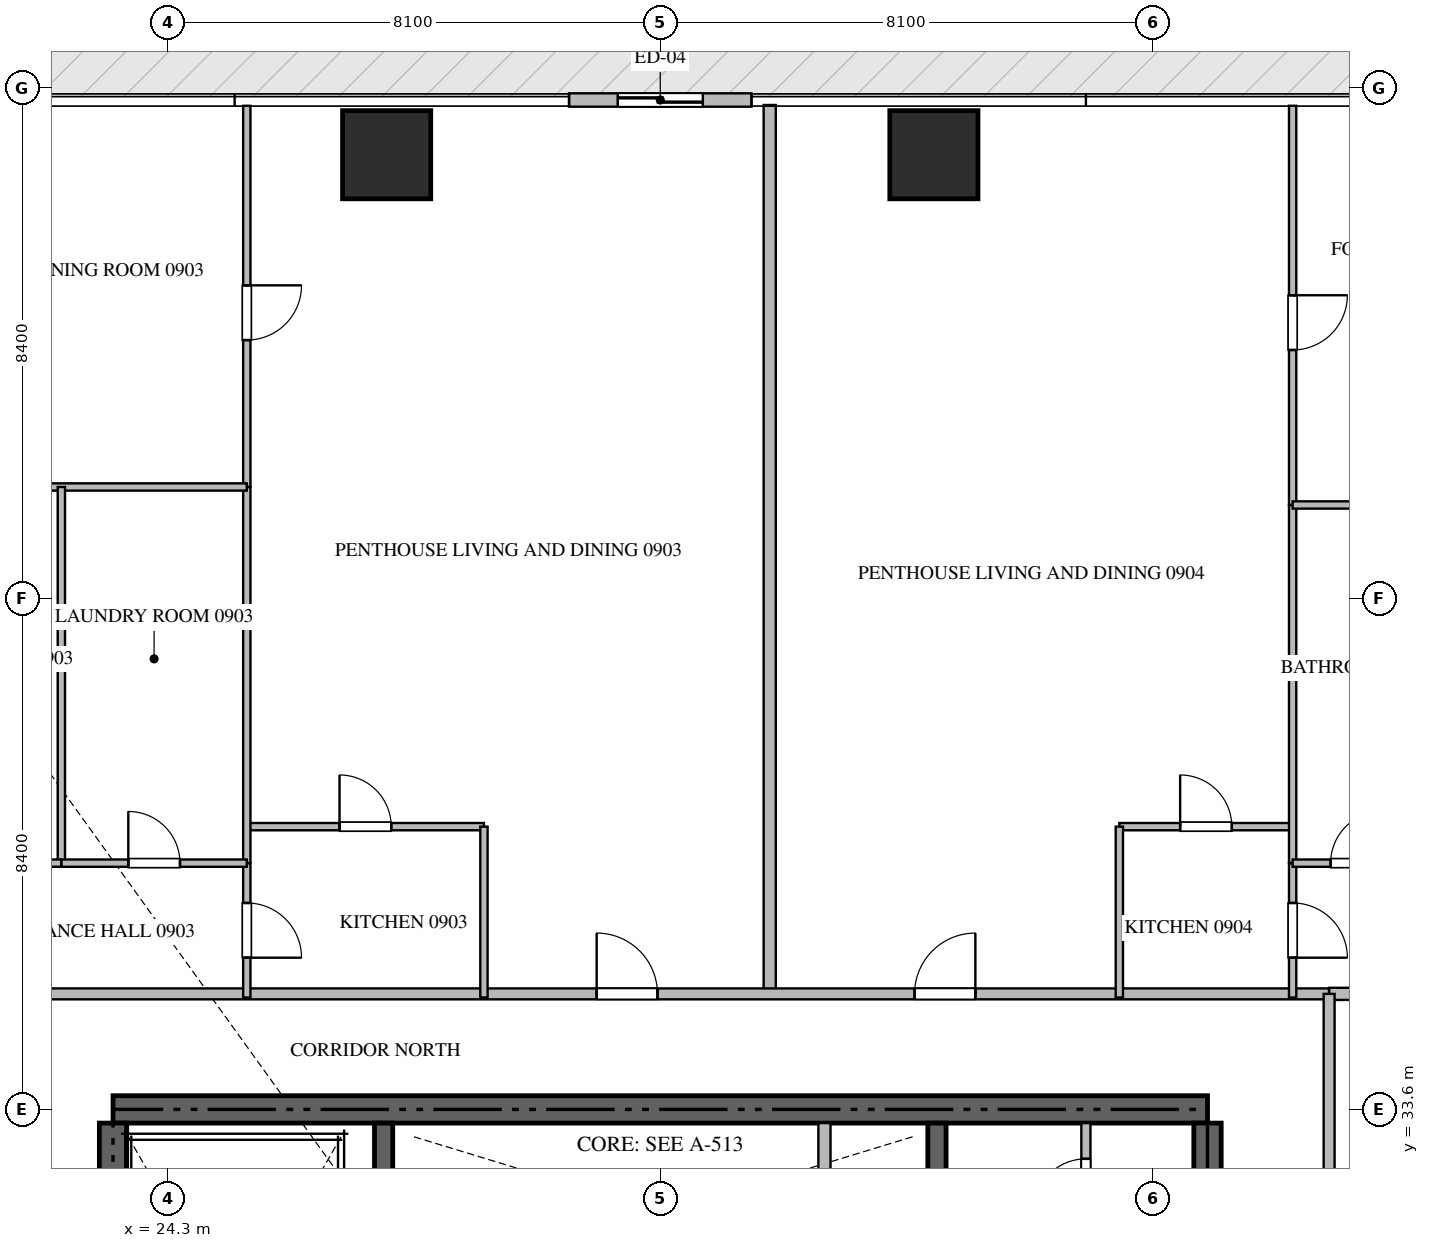
"""IFC4 building model, lengths in metres.
Left out: names, types, materials, properties, quantities, classifications, styles, units other than length and angle.
Written with IfcOpenShell. Run it as: python <this file> out.ifc"""

import sys

from ifc_helpers import new_model, si_unit, direction, frame, frame_2d, origin, origin_2d, place, context, subcontext, project, spatial, rectangle, extrude, source, transform, mapped, element, fill, save


model = new_model("IFC4")
c1 = context("Model", 3, precision=1e-05, world=origin(), true_north=direction((0.0, 1.0)))
c2 = subcontext(c1, "Body", "Model", "MODEL_VIEW")
j1 = project(units=[si_unit("LENGTHUNIT", "METRE"), si_unit("PLANEANGLEUNIT", "RADIAN")], contexts=[c1])
p1 = place(None, origin())
s1 = spatial("IfcSite", under=j1, at=p1, CompositionType="ELEMENT")
p2 = place(p1, origin())
s2 = spatial("IfcBuilding", under=s1, at=p2, CompositionType="ELEMENT")
p3 = place(p2, frame((0.0, 0.0, 41.7)))
s3 = spatial("IfcBuildingStorey", under=s2, at=p3, CompositionType="ELEMENT", Elevation=41.7)
p4 = place(p3, frame((41.4, 33.6, -0.26), z_axis=(0.0, 0.0, 1.0), x_axis=(-1.0, 0.0, 0.0)))
e1 = element("IfcWall", 1, at=p4, inside=s3, PredefinedType="SHEAR", context=c2, shape_type="SweptSolid", body=[
    extrude(rectangle(XDim=18.0, YDim=0.45, at=frame_2d((9.0, 0.0))), origin(), (0.0, 0.0, 1.0), 3.748),
])
p5 = place(p3, frame((23.4, 24.25, -0.26), z_axis=(0.0, 0.0, 1.0), x_axis=(0.0, 1.0, 0.0)))
e2 = element("IfcWall", 2, at=p5, inside=s3, PredefinedType="SHEAR", context=c2, shape_type="SweptSolid", body=[
    extrude(rectangle(XDim=9.125, YDim=0.45, at=frame_2d((4.562, 0.0))), origin(), (0.0, 0.0, 1.0), 3.748),
])
p6 = place(p3, frame((41.4, 27.75, -0.26), z_axis=(0.0, 0.0, 1.0), x_axis=(0.0, 1.0, 0.0)))
e3 = element("IfcWall", 3, at=p6, inside=s3, PredefinedType="SHEAR", context=c2, shape_type="SweptSolid", body=[
    extrude(rectangle(XDim=5.625, YDim=0.45, at=frame_2d((2.812, 0.0))), origin(), (0.0, 0.0, 1.0), 3.748),
])
p7 = place(p3, frame((27.85, 23.55, -0.26), z_axis=(0.0, 0.0, 1.0), x_axis=(0.0, 1.0, 0.0)))
e4 = element("IfcWall", 4, at=p7, inside=s3, PredefinedType="SHEAR", context=c2, shape_type="SweptSolid", body=[
    extrude(rectangle(XDim=9.825, YDim=0.3, at=frame_2d((4.913, 0.0))), origin(), (0.0, 0.0, 1.0), 3.748),
])
p8 = place(p3, frame((36.95, 27.05, -0.26), z_axis=(0.0, 0.0, 1.0), x_axis=(0.0, 1.0, 0.0)))
e5 = element("IfcWall", 5, at=p8, inside=s3, PredefinedType="SHEAR", context=c2, shape_type="SweptSolid", body=[
    extrude(rectangle(XDim=6.325, YDim=0.3, at=frame_2d((3.163, 0.0))), origin(), (0.0, 0.0, 1.0), 3.748),
])
m1 = source(origin(), c2, "Body", "SweptSolid", [
    extrude(rectangle(XDim=1.45, YDim=1.45, at=origin_2d()), origin(), (0.0, 0.0, 1.0), 3.75),
])
for number, where, z_axis, x_axis in (
    (6, (27.9, 49.3, -0.26), (0.0, 0.0, 1.0), (1.0, 0.0, 0.0)),
    (7, (36.9, 49.3, -0.26), (0.0, 0.0, 1.0), (1.0, 0.0, 0.0)),
):
    element("IfcColumn", number, at=place(p3, frame(where, z_axis=z_axis, x_axis=x_axis)), inside=s3, PredefinedType="COLUMN", context=c2, shape_type="MappedRepresentation", body=[
        mapped(m1, transform((0.0, 0.0, 0.0), scale=1.0)),
    ])
p9 = place(p3, frame((33.9, 50.2, 0.0), z_axis=(0.0, 0.0, 1.0), x_axis=(-1.0, 0.0, 0.0)))
e8 = element("IfcWall", 8, at=p9, inside=s3, PredefinedType="ELEMENTEDWALL", context=c2, shape_type="SweptSolid", body=[
    extrude(rectangle(XDim=3.0, YDim=0.22, at=frame_2d((1.5, 0.0))), origin(), (0.0, 0.0, 1.0), 3.475),
])
p10 = place(p9, frame((0.8, 0.0, 0.0)))
e9 = element("IfcOpeningElement", 9, at=p10, cuts=e8, PredefinedType="OPENING", context=c2, shape_type="SweptSolid", body=[
    extrude(rectangle(XDim=1.4, YDim=2.25, at=frame_2d((0.7, 1.125))), frame((0.0, 0.12, 0.0), z_axis=(0.0, -1.0, 0.0), x_axis=(1.0, 0.0, 0.0)), (0.0, 0.0, 1.0), 0.24),
])
p11 = place(p3, frame((35.1, 30.75, 0.0), z_axis=(0.0, 0.0, 1.0), x_axis=(0.0, 1.0, 0.0)))
e10 = element("IfcWall", 10, at=p11, inside=s3, PredefinedType="STANDARD", context=c2, shape_type="SweptSolid", body=[
    extrude(rectangle(XDim=2.625, YDim=0.2, at=frame_2d((1.312, 0.0))), origin(), (0.0, 0.0, 1.0), 3.49),
])
p12 = place(p3, frame((39.4, 31.35, 0.0), z_axis=(0.0, 0.0, 1.0), x_axis=(0.0, 1.0, 0.0)))
e11 = element("IfcWall", 11, at=p12, inside=s3, PredefinedType="PARTITIONING", context=c2, shape_type="SweptSolid", body=[
    extrude(rectangle(XDim=2.025, YDim=0.15, at=frame_2d((1.012, 0.0))), origin(), (0.0, 0.0, 1.0), 3.49),
])
p13 = place(p12, frame((0.587, 0.0, 0.0)))
e12 = element("IfcOpeningElement", 12, at=p13, cuts=e11, PredefinedType="OPENING", context=c2, shape_type="SweptSolid", body=[
    extrude(rectangle(XDim=0.85, YDim=2.1, at=frame_2d((0.425, 1.05))), frame((0.0, 0.085, 0.0), z_axis=(0.0, -1.0, 0.0), x_axis=(1.0, 0.0, 0.0)), (0.0, 0.0, 1.0), 0.17),
])
p14 = place(p3, frame((34.2, 35.5, 0.0), z_axis=(0.0, 0.0, 1.0), x_axis=(0.0, 1.0, 0.0)))
e13 = element("IfcWall", 13, at=p14, inside=s3, PredefinedType="PARTITIONING", context=c2, shape_type="SweptSolid", body=[
    extrude(rectangle(XDim=14.618, YDim=0.2, at=frame_2d((7.309, 0.0))), origin(), (0.0, 0.0, 1.0), 3.49),
])
p15 = place(p3, frame((43.4, 35.5, 0.0), z_axis=(0.0, 0.0, 1.0), x_axis=(1.0, 0.0, 0.0)))
e14 = element("IfcWall", 14, at=p15, inside=s3, PredefinedType="PARTITIONING", context=c2, shape_type="SweptSolid", body=[
    extrude(rectangle(XDim=15.318, YDim=0.2, at=frame_2d((7.659, 0.0))), origin(), (0.0, 0.0, 1.0), 3.49),
])
p16 = place(p3, frame((21.402, 35.5, 0.0), z_axis=(0.0, 0.0, 1.0), x_axis=(1.0, 0.0, 0.0)))
e15 = element("IfcWall", 15, at=p16, inside=s3, PredefinedType="PARTITIONING", context=c2, shape_type="SweptSolid", body=[
    extrude(rectangle(XDim=21.996, YDim=0.18, at=frame_2d((10.998, 0.0))), origin(), (0.0, 0.0, 1.0), 3.49),
])
p17 = place(p16, frame((9.952, 0.0, 0.0)))
e16 = element("IfcOpeningElement", 16, at=p17, cuts=e15, PredefinedType="OPENING", context=c2, shape_type="SweptSolid", body=[
    extrude(rectangle(XDim=1.0, YDim=2.15, at=frame_2d((0.5, 1.075))), frame((0.0, 0.1, 0.0), z_axis=(0.0, -1.0, 0.0), x_axis=(1.0, 0.0, 0.0)), (0.0, 0.0, 1.0), 0.2),
])
p18 = place(p16, frame((15.18, 0.0, 0.0)))
e17 = element("IfcOpeningElement", 17, at=p18, cuts=e15, PredefinedType="OPENING", context=c2, shape_type="SweptSolid", body=[
    extrude(rectangle(XDim=1.0, YDim=2.15, at=frame_2d((0.5, 1.075))), frame((0.0, 0.1, 0.0), z_axis=(0.0, -1.0, 0.0), x_axis=(1.0, 0.0, 0.0)), (0.0, 0.0, 1.0), 0.2),
])
p19 = place(p3, frame((43.4, 14.9, 0.0), z_axis=(0.0, 0.0, 1.0), x_axis=(0.0, 1.0, 0.0)))
e18 = element("IfcWall", 18, at=p19, inside=s3, PredefinedType="PARTITIONING", context=c2, shape_type="SweptSolid", body=[
    extrude(rectangle(XDim=20.6, YDim=0.18, at=frame_2d((10.3, 0.0))), origin(), (0.0, 0.0, 1.0), 3.49),
])
p20 = place(p19, frame((1.96, 0.0, 0.0)))
e19 = element("IfcOpeningElement", 19, at=p20, cuts=e18, PredefinedType="OPENING", context=c2, shape_type="SweptSolid", body=[
    extrude(rectangle(XDim=1.0, YDim=2.15, at=frame_2d((0.5, 1.075))), frame((0.0, 0.1, 0.0), z_axis=(0.0, -1.0, 0.0), x_axis=(1.0, 0.0, 0.0)), (0.0, 0.0, 1.0), 0.2),
])
p21 = place(p3, frame((25.6, 38.25, 0.0), z_axis=(0.0, 0.0, 1.0), x_axis=(1.0, 0.0, 0.0)))
e20 = element("IfcWall", 20, at=p21, inside=s3, PredefinedType="PARTITIONING", context=c2, shape_type="SweptSolid", body=[
    extrude(rectangle(XDim=3.9, YDim=0.12, at=frame_2d((1.95, 0.0))), origin(), (0.0, 0.0, 1.0), 3.49),
])
p22 = place(p21, frame((1.525, 0.0, 0.0)))
e21 = element("IfcOpeningElement", 21, at=p22, cuts=e20, PredefinedType="OPENING", context=c2, shape_type="SweptSolid", body=[
    extrude(rectangle(XDim=0.85, YDim=2.1, at=frame_2d((0.425, 1.05))), frame((0.0, 0.07, 0.0), z_axis=(0.0, -1.0, 0.0), x_axis=(1.0, 0.0, 0.0)), (0.0, 0.0, 1.0), 0.14),
])
p23 = place(p3, frame((29.5, 38.25, 0.0), z_axis=(0.0, 0.0, 1.0), x_axis=(0.0, -1.0, 0.0)))
e22 = element("IfcWall", 22, at=p23, inside=s3, PredefinedType="PARTITIONING", context=c2, shape_type="SweptSolid", body=[
    extrude(rectangle(XDim=2.81, YDim=0.12, at=frame_2d((1.405, 0.0))), origin(), (0.0, 0.0, 1.0), 3.49),
])
p24 = place(p3, frame((25.6, 37.65, 0.0), z_axis=(0.0, 0.0, 1.0), x_axis=(0.0, -1.0, 0.0)))
e23 = element("IfcWall", 23, at=p24, inside=s3, PredefinedType="PARTITIONING", context=c2, shape_type="SweptSolid", body=[
    extrude(rectangle(XDim=2.21, YDim=0.12, at=frame_2d((1.105, 0.0))), origin(), (0.0, 0.0, 1.0), 3.49),
])
p25 = place(p24, frame((0.655, 0.0, 0.0)))
e24 = element("IfcOpeningElement", 24, at=p25, cuts=e23, PredefinedType="OPENING", context=c2, shape_type="SweptSolid", body=[
    extrude(rectangle(XDim=0.9, YDim=2.1, at=frame_2d((0.45, 1.05))), frame((0.0, 0.07, 0.0), z_axis=(0.0, -1.0, 0.0), x_axis=(1.0, 0.0, 0.0)), (0.0, 0.0, 1.0), 0.14),
])
p26 = place(p3, frame((25.6, 50.105, 0.0), z_axis=(0.0, 0.0, 1.0), x_axis=(0.0, -1.0, 0.0)))
e25 = element("IfcWall", 25, at=p26, inside=s3, PredefinedType="PARTITIONING", context=c2, shape_type="SweptSolid", body=[
    extrude(rectangle(XDim=6.269, YDim=0.12, at=frame_2d((3.135, 0.0))), origin(), (0.0, 0.0, 1.0), 3.49),
])
p27 = place(p26, frame((2.953, 0.0, 0.0)))
e26 = element("IfcOpeningElement", 26, at=p27, cuts=e25, PredefinedType="OPENING", context=c2, shape_type="SweptSolid", body=[
    extrude(rectangle(XDim=0.9, YDim=2.1, at=frame_2d((0.45, 1.05))), frame((0.0, 0.07, 0.0), z_axis=(0.0, -1.0, 0.0), x_axis=(1.0, 0.0, 0.0)), (0.0, 0.0, 1.0), 0.14),
])
p28 = place(p3, frame((25.6, 43.834, 0.0), z_axis=(0.0, 0.0, 1.0), x_axis=(0.0, -1.0, 0.0)))
e27 = element("IfcWall", 27, at=p28, inside=s3, PredefinedType="PARTITIONING", context=c2, shape_type="SweptSolid", body=[
    extrude(rectangle(XDim=6.182, YDim=0.12, at=frame_2d((3.091, 0.0))), origin(), (0.0, 0.0, 1.0), 3.49),
])
p29 = place(p3, frame((20.45, 43.836, 0.0), z_axis=(0.0, 0.0, 1.0), x_axis=(1.0, 0.0, 0.0)))
e28 = element("IfcWall", 28, at=p29, inside=s3, PredefinedType="PARTITIONING", context=c2, shape_type="SweptSolid", body=[
    extrude(rectangle(XDim=5.15, YDim=0.12, at=frame_2d((2.575, 0.0))), origin(), (0.0, 0.0, 1.0), 3.49),
])
p30 = place(p3, frame((22.55, 43.836, 0.0), z_axis=(0.0, 0.0, 1.0), x_axis=(0.0, -1.0, 0.0)))
e29 = element("IfcWall", 29, at=p30, inside=s3, PredefinedType="PARTITIONING", context=c2, shape_type="SweptSolid", body=[
    extrude(rectangle(XDim=6.186, YDim=0.12, at=frame_2d((3.093, 0.0))), origin(), (0.0, 0.0, 1.0), 3.49),
])
p31 = place(p3, frame((20.45, 37.65, 0.0), z_axis=(0.0, 0.0, 1.0), x_axis=(1.0, 0.0, 0.0)))
e30 = element("IfcWall", 30, at=p31, inside=s3, PredefinedType="PARTITIONING", context=c2, shape_type="SweptSolid", body=[
    extrude(rectangle(XDim=2.1, YDim=0.12, at=frame_2d((1.05, 0.0))), origin(), (0.0, 0.0, 1.0), 3.49),
])
p32 = place(p31, frame((0.625, 0.0, 0.0)))
e31 = element("IfcOpeningElement", 31, at=p32, cuts=e30, PredefinedType="OPENING", context=c2, shape_type="SweptSolid", body=[
    extrude(rectangle(XDim=0.85, YDim=2.1, at=frame_2d((0.425, 1.05))), frame((0.0, 0.07, 0.0), z_axis=(0.0, -1.0, 0.0), x_axis=(1.0, 0.0, 0.0)), (0.0, 0.0, 1.0), 0.14),
])
p33 = place(p3, frame((22.552, 37.65, 0.0), z_axis=(0.0, 0.0, 1.0), x_axis=(1.0, 0.0, 0.0)))
e32 = element("IfcWall", 32, at=p33, inside=s3, PredefinedType="PARTITIONING", context=c2, shape_type="SweptSolid", body=[
    extrude(rectangle(XDim=3.048, YDim=0.12, at=frame_2d((1.524, 0.0))), origin(), (0.0, 0.0, 1.0), 3.49),
])
p34 = place(p33, frame((1.099, 0.0, 0.0)))
e33 = element("IfcOpeningElement", 33, at=p34, cuts=e32, PredefinedType="OPENING", context=c2, shape_type="SweptSolid", body=[
    extrude(rectangle(XDim=0.85, YDim=2.1, at=frame_2d((0.425, 1.05))), frame((0.0, 0.07, 0.0), z_axis=(0.0, -1.0, 0.0), x_axis=(1.0, 0.0, 0.0)), (0.0, 0.0, 1.0), 0.14),
])
p35 = place(p3, frame((39.95, 38.25, 0.0), z_axis=(0.0, 0.0, 1.0), x_axis=(1.0, 0.0, 0.0)))
e34 = element("IfcWall", 34, at=p35, inside=s3, PredefinedType="PARTITIONING", context=c2, shape_type="SweptSolid", body=[
    extrude(rectangle(XDim=2.85, YDim=0.12, at=frame_2d((1.425, 0.0))), origin(), (0.0, 0.0, 1.0), 3.49),
])
p36 = place(p35, frame((1.0, 0.0, 0.0)))
e35 = element("IfcOpeningElement", 35, at=p36, cuts=e34, PredefinedType="OPENING", context=c2, shape_type="SweptSolid", body=[
    extrude(rectangle(XDim=0.85, YDim=2.1, at=frame_2d((0.425, 1.05))), frame((0.0, 0.07, 0.0), z_axis=(0.0, -1.0, 0.0), x_axis=(1.0, 0.0, 0.0)), (0.0, 0.0, 1.0), 0.14),
])
p37 = place(p3, frame((39.95, 38.25, 0.0), z_axis=(0.0, 0.0, 1.0), x_axis=(0.0, -1.0, 0.0)))
e36 = element("IfcWall", 36, at=p37, inside=s3, PredefinedType="PARTITIONING", context=c2, shape_type="SweptSolid", body=[
    extrude(rectangle(XDim=2.81, YDim=0.12, at=frame_2d((1.405, 0.0))), origin(), (0.0, 0.0, 1.0), 3.49),
])
p38 = place(p3, frame((42.8, 37.65, 0.0), z_axis=(0.0, 0.0, 1.0), x_axis=(0.0, -1.0, 0.0)))
e37 = element("IfcWall", 37, at=p38, inside=s3, PredefinedType="PARTITIONING", context=c2, shape_type="SweptSolid", body=[
    extrude(rectangle(XDim=2.21, YDim=0.12, at=frame_2d((1.105, 0.0))), origin(), (0.0, 0.0, 1.0), 3.49),
])
p39 = place(p38, frame((0.655, 0.0, 0.0)))
e38 = element("IfcOpeningElement", 38, at=p39, cuts=e37, PredefinedType="OPENING", context=c2, shape_type="SweptSolid", body=[
    extrude(rectangle(XDim=0.9, YDim=2.1, at=frame_2d((0.45, 1.05))), frame((0.0, 0.07, 0.0), z_axis=(0.0, -1.0, 0.0), x_axis=(1.0, 0.0, 0.0)), (0.0, 0.0, 1.0), 0.14),
])
p40 = place(p3, frame((42.8, 50.105, 0.0), z_axis=(0.0, 0.0, 1.0), x_axis=(0.0, -1.0, 0.0)))
e39 = element("IfcWall", 39, at=p40, inside=s3, PredefinedType="PARTITIONING", context=c2, shape_type="SweptSolid", body=[
    extrude(rectangle(XDim=6.565, YDim=0.12, at=frame_2d((3.282, 0.0))), origin(), (0.0, 0.0, 1.0), 3.49),
])
p41 = place(p40, frame((3.116, 0.0, 0.0)))
e40 = element("IfcOpeningElement", 40, at=p41, cuts=e39, PredefinedType="OPENING", context=c2, shape_type="SweptSolid", body=[
    extrude(rectangle(XDim=0.9, YDim=2.1, at=frame_2d((0.45, 1.05))), frame((0.0, 0.07, 0.0), z_axis=(0.0, -1.0, 0.0), x_axis=(1.0, 0.0, 0.0)), (0.0, 0.0, 1.0), 0.14),
])
p42 = place(p3, frame((42.8, 43.538, 0.0), z_axis=(0.0, 0.0, 1.0), x_axis=(0.0, -1.0, 0.0)))
e41 = element("IfcWall", 41, at=p42, inside=s3, PredefinedType="PARTITIONING", context=c2, shape_type="SweptSolid", body=[
    extrude(rectangle(XDim=5.886, YDim=0.12, at=frame_2d((2.943, 0.0))), origin(), (0.0, 0.0, 1.0), 3.49),
])
p43 = place(p3, frame((42.8, 43.54, 0.0), z_axis=(0.0, 0.0, 1.0), x_axis=(1.0, 0.0, 0.0)))
e42 = element("IfcWall", 42, at=p43, inside=s3, PredefinedType="PARTITIONING", context=c2, shape_type="SweptSolid", body=[
    extrude(rectangle(XDim=5.15, YDim=0.12, at=frame_2d((2.575, 0.0))), origin(), (0.0, 0.0, 1.0), 3.49),
])
p44 = place(p3, frame((42.8, 37.65, 0.0), z_axis=(0.0, 0.0, 1.0), x_axis=(1.0, 0.0, 0.0)))
e43 = element("IfcWall", 43, at=p44, inside=s3, PredefinedType="PARTITIONING", context=c2, shape_type="SweptSolid", body=[
    extrude(rectangle(XDim=2.1, YDim=0.12, at=frame_2d((1.05, 0.0))), origin(), (0.0, 0.0, 1.0), 3.49),
])
p45 = place(p44, frame((0.625, 0.0, 0.0)))
e44 = element("IfcOpeningElement", 44, at=p45, cuts=e43, PredefinedType="OPENING", context=c2, shape_type="SweptSolid", body=[
    extrude(rectangle(XDim=0.85, YDim=2.1, at=frame_2d((0.425, 1.05))), frame((0.0, 0.07, 0.0), z_axis=(0.0, -1.0, 0.0), x_axis=(1.0, 0.0, 0.0)), (0.0, 0.0, 1.0), 0.14),
])
m2 = source(origin(), c2, "Body", "SweptSolid", [
    extrude(rectangle(XDim=1.4, YDim=2.25, at=frame_2d((0.7, 1.125))), frame((0.0, 0.025, 0.0), z_axis=(0.0, -1.0, 0.0), x_axis=(1.0, 0.0, 0.0)), (0.0, 0.0, 1.0), 0.05),
])
p46 = place(p10, origin())
e45 = element("IfcDoor", 45, at=p46, inside=s3, OperationType="SLIDING_TO_LEFT", PredefinedType="DOOR", context=c2, shape_type="MappedRepresentation", body=[
    mapped(m2, transform((0.0, 0.0, 0.0), scale=1.0)),
])
fill(e9, e45)
m3 = source(origin(), c2, "Body", "SweptSolid", [
    extrude(rectangle(XDim=0.85, YDim=2.1, at=frame_2d((0.425, 1.05))), frame((0.0, 0.025, 0.0), z_axis=(0.0, -1.0, 0.0), x_axis=(1.0, 0.0, 0.0)), (0.0, 0.0, 1.0), 0.05),
])
p47 = place(p13, origin())
e46 = element("IfcDoor", 46, at=p47, inside=s3, OperationType="SINGLE_SWING_LEFT", PredefinedType="DOOR", context=c2, shape_type="MappedRepresentation", body=[
    mapped(m3, transform((0.0, 0.0, 0.0), scale=1.0)),
])
fill(e12, e46)
m4 = source(origin(), c2, "Body", "SweptSolid", [
    extrude(rectangle(XDim=1.0, YDim=2.15, at=frame_2d((0.5, 1.075))), frame((0.0, 0.025, 0.0), z_axis=(0.0, -1.0, 0.0), x_axis=(1.0, 0.0, 0.0)), (0.0, 0.0, 1.0), 0.05),
])
p48 = place(p17, origin())
e47 = element("IfcDoor", 47, at=p48, inside=s3, OperationType="SINGLE_SWING_LEFT", PredefinedType="DOOR", context=c2, shape_type="MappedRepresentation", body=[
    mapped(m4, transform((0.0, 0.0, 0.0), scale=1.0)),
])
fill(e16, e47)
p49 = place(p18, origin())
e48 = element("IfcDoor", 48, at=p49, inside=s3, OperationType="SINGLE_SWING_RIGHT", PredefinedType="DOOR", context=c2, shape_type="MappedRepresentation", body=[
    mapped(m4, transform((0.0, 0.0, 0.0), scale=1.0)),
])
fill(e17, e48)
p50 = place(p22, origin())
e49 = element("IfcDoor", 49, at=p50, inside=s3, OperationType="SINGLE_SWING_LEFT", PredefinedType="DOOR", context=c2, shape_type="MappedRepresentation", body=[
    mapped(m3, transform((0.0, 0.0, 0.0), scale=1.0)),
])
fill(e21, e49)
m5 = source(origin(), c2, "Body", "SweptSolid", [
    extrude(rectangle(XDim=0.9, YDim=2.1, at=frame_2d((0.45, 1.05))), frame((0.0, 0.025, 0.0), z_axis=(0.0, -1.0, 0.0), x_axis=(1.0, 0.0, 0.0)), (0.0, 0.0, 1.0), 0.05),
])
p51 = place(p25, origin())
e50 = element("IfcDoor", 50, at=p51, inside=s3, OperationType="SINGLE_SWING_RIGHT", PredefinedType="DOOR", context=c2, shape_type="MappedRepresentation", body=[
    mapped(m5, transform((0.0, 0.0, 0.0), scale=1.0)),
])
fill(e24, e50)
p52 = place(p27, origin())
e51 = element("IfcDoor", 51, at=p52, inside=s3, OperationType="SINGLE_SWING_LEFT", PredefinedType="DOOR", context=c2, shape_type="MappedRepresentation", body=[
    mapped(m5, transform((0.0, 0.0, 0.0), scale=1.0)),
])
fill(e26, e51)
p53 = place(p34, origin())
e52 = element("IfcDoor", 52, at=p53, inside=s3, OperationType="SINGLE_SWING_LEFT", PredefinedType="DOOR", context=c2, shape_type="MappedRepresentation", body=[
    mapped(m3, transform((0.0, 0.0, 0.0), scale=1.0)),
])
fill(e33, e52)
p54 = place(p36, origin())
e53 = element("IfcDoor", 53, at=p54, inside=s3, OperationType="SINGLE_SWING_LEFT", PredefinedType="DOOR", context=c2, shape_type="MappedRepresentation", body=[
    mapped(m3, transform((0.0, 0.0, 0.0), scale=1.0)),
])
fill(e35, e53)
p55 = place(p39, origin())
e54 = element("IfcDoor", 54, at=p55, inside=s3, OperationType="SINGLE_SWING_RIGHT", PredefinedType="DOOR", context=c2, shape_type="MappedRepresentation", body=[
    mapped(m5, transform((0.0, 0.0, 0.0), scale=1.0)),
])
fill(e38, e54)
p56 = place(p41, origin())
e55 = element("IfcDoor", 55, at=p56, inside=s3, OperationType="SINGLE_SWING_LEFT", PredefinedType="DOOR", context=c2, shape_type="MappedRepresentation", body=[
    mapped(m5, transform((0.0, 0.0, 0.0), scale=1.0)),
])
fill(e40, e55)
p57 = place(p45, origin())
e56 = element("IfcDoor", 56, at=p57, inside=s3, OperationType="SINGLE_SWING_RIGHT", PredefinedType="DOOR", context=c2, shape_type="MappedRepresentation", body=[
    mapped(m3, transform((0.0, 0.0, 0.0), scale=1.0)),
])
fill(e44, e56)
save(model, sys.argv[1])
